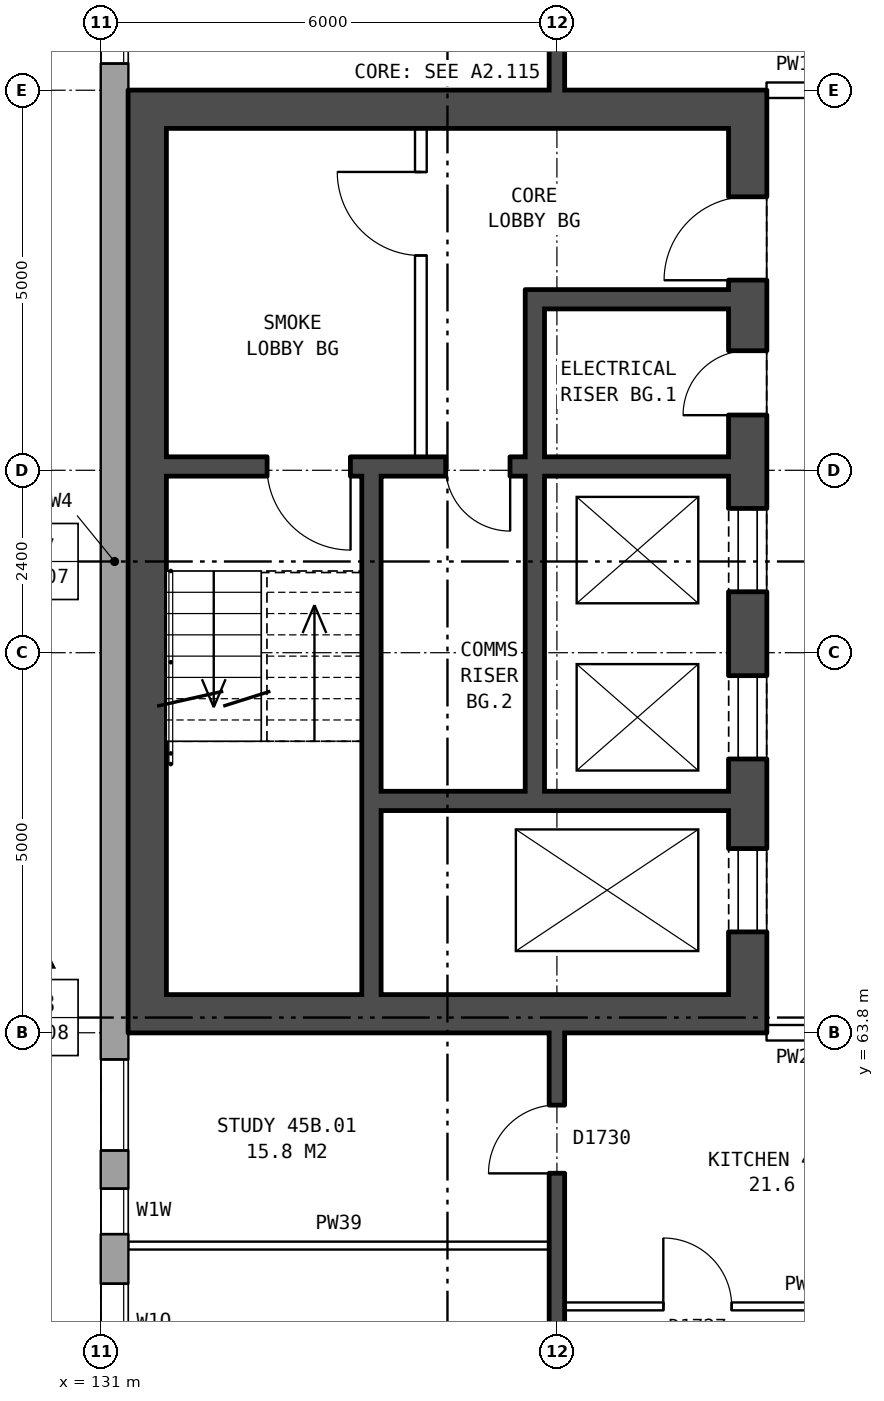
"""IFC4 building model, lengths in metres.
Left out: names, types, materials, properties, quantities, classifications, styles, units other than length and angle.
Written with IfcOpenShell. Run it as: python <this file> out.ifc"""

import sys

from ifc_helpers import new_model, si_unit, direction, frame, frame_2d, origin, place, context, subcontext, project, spatial, rectangle, extrude, element, fill, save


model = new_model("IFC4")
c1 = context("Model", 3, precision=1e-05, world=origin(), true_north=direction((0.0, 1.0)))
c2 = subcontext(c1, "Body", "Model", "MODEL_VIEW")
j1 = project(units=[si_unit("LENGTHUNIT", "METRE"), si_unit("PLANEANGLEUNIT", "RADIAN")], contexts=[c1])
p1 = place(None, origin())
s1 = spatial("IfcSite", under=j1, at=p1, CompositionType="ELEMENT")
p2 = place(p1, origin())
s2 = spatial("IfcBuilding", under=s1, at=p2, CompositionType="ELEMENT")
p3 = place(p2, frame((0.0, 0.0, 160.9)))
s3 = spatial("IfcBuildingStorey", under=s2, at=p3, CompositionType="ELEMENT", Elevation=160.9)
p4 = place(p3, frame((131.18, 82.925, 0.0), z_axis=(0.0, 0.0, 1.0), x_axis=(0.0, -1.0, 0.0)))
e1 = element("IfcWall", 1, at=p4, inside=s3, PredefinedType="STANDARD", context=c2, shape_type="SweptSolid", body=[
    extrude(rectangle(XDim=25.851, YDim=0.36, at=frame_2d((12.925, 0.0))), origin(), (0.0, 0.0, 1.0), 2.85),
])
p5 = place(p4, frame((1.075, 0.0, 0.8)))
e2 = element("IfcOpeningElement", 2, at=p5, cuts=e1, PredefinedType="OPENING", context=c2, shape_type="SweptSolid", body=[
    extrude(rectangle(XDim=1.2, YDim=1.8, at=frame_2d((0.6, 0.9))), frame((0.0, 0.19, 0.0), z_axis=(0.0, -1.0, 0.0), x_axis=(1.0, 0.0, 0.0)), (0.0, 0.0, 1.0), 0.38),
])
p6 = place(p4, frame((2.575, 0.0, 0.8)))
e3 = element("IfcOpeningElement", 3, at=p6, cuts=e1, PredefinedType="OPENING", context=c2, shape_type="SweptSolid", body=[
    extrude(rectangle(XDim=1.2, YDim=0.9, at=frame_2d((0.6, 0.45))), frame((0.0, 0.19, 0.0), z_axis=(0.0, -1.0, 0.0), x_axis=(1.0, 0.0, 0.0)), (0.0, 0.0, 1.0), 0.38),
])
p7 = place(p4, frame((19.475, 0.0, 1.65)))
e4 = element("IfcOpeningElement", 4, at=p7, cuts=e1, PredefinedType="OPENING", context=c2, shape_type="SweptSolid", body=[
    extrude(rectangle(XDim=1.2, YDim=0.9, at=frame_2d((0.6, 0.45))), frame((0.0, 0.19, 0.0), z_axis=(0.0, -1.0, 0.0), x_axis=(1.0, 0.0, 0.0)), (0.0, 0.0, 1.0), 0.38),
])
p8 = place(p4, frame((22.425, 0.0, 0.8)))
e5 = element("IfcOpeningElement", 5, at=p8, cuts=e1, PredefinedType="OPENING", context=c2, shape_type="SweptSolid", body=[
    extrude(rectangle(XDim=1.0, YDim=1.2, at=frame_2d((0.5, 0.6))), frame((0.0, 0.19, 0.0), z_axis=(0.0, -1.0, 0.0), x_axis=(1.0, 0.0, 0.0)), (0.0, 0.0, 1.0), 0.38),
])
p9 = place(p4, frame((4.975, 0.0, 1.7)))
e6 = element("IfcOpeningElement", 6, at=p9, cuts=e1, PredefinedType="OPENING", context=c2, shape_type="SweptSolid", body=[
    extrude(rectangle(XDim=1.4, YDim=0.9, at=frame_2d((0.7, 0.45))), frame((0.0, 0.19, 0.0), z_axis=(0.0, -1.0, 0.0), x_axis=(1.0, 0.0, 0.0)), (0.0, 0.0, 1.0), 0.38),
])
p10 = place(p4, frame((21.175, 0.0, 0.35)))
e7 = element("IfcOpeningElement", 7, at=p10, cuts=e1, PredefinedType="OPENING", context=c2, shape_type="SweptSolid", body=[
    extrude(rectangle(XDim=0.6, YDim=0.9, at=frame_2d((0.3, 0.45))), frame((0.0, 0.19, 0.0), z_axis=(0.0, -1.0, 0.0), x_axis=(1.0, 0.0, 0.0)), (0.0, 0.0, 1.0), 0.38),
])
p11 = place(p4, frame((23.725, 0.0, 0.8)))
e8 = element("IfcOpeningElement", 8, at=p11, cuts=e1, PredefinedType="OPENING", context=c2, shape_type="SweptSolid", body=[
    extrude(rectangle(XDim=1.4, YDim=1.8, at=frame_2d((0.7, 0.9))), frame((0.0, 0.19, 0.0), z_axis=(0.0, -1.0, 0.0), x_axis=(1.0, 0.0, 0.0)), (0.0, 0.0, 1.0), 0.38),
])
p12 = place(p3, frame((139.51, 63.8, 0.0), z_axis=(0.0, 0.0, 1.0), x_axis=(0.0, 1.0, 0.0)))
e9 = element("IfcWall", 9, at=p12, inside=s3, PredefinedType="SHEAR", context=c2, shape_type="SweptSolid", body=[
    extrude(rectangle(XDim=12.4, YDim=0.5, at=frame_2d((6.2, 0.0))), origin(), (0.0, 0.0, 1.0), 2.85),
])
p13 = place(p12, frame((1.325, 0.0, 0.0)))
e10 = element("IfcOpeningElement", 10, at=p13, cuts=e9, PredefinedType="OPENING", context=c2, shape_type="SweptSolid", body=[
    extrude(rectangle(XDim=1.1, YDim=2.1, at=frame_2d((0.55, 1.05))), frame((0.0, 0.26, 0.0), z_axis=(0.0, -1.0, 0.0), x_axis=(1.0, 0.0, 0.0)), (0.0, 0.0, 1.0), 0.52),
])
p14 = place(p12, frame((3.6, 0.0, 0.0)))
e11 = element("IfcOpeningElement", 11, at=p14, cuts=e9, PredefinedType="OPENING", context=c2, shape_type="SweptSolid", body=[
    extrude(rectangle(XDim=1.1, YDim=2.1, at=frame_2d((0.55, 1.05))), frame((0.0, 0.26, 0.0), z_axis=(0.0, -1.0, 0.0), x_axis=(1.0, 0.0, 0.0)), (0.0, 0.0, 1.0), 0.52),
])
p15 = place(p12, frame((5.8, 0.0, 0.0)))
e12 = element("IfcOpeningElement", 12, at=p15, cuts=e9, PredefinedType="OPENING", context=c2, shape_type="SweptSolid", body=[
    extrude(rectangle(XDim=1.1, YDim=2.1, at=frame_2d((0.55, 1.05))), frame((0.0, 0.26, 0.0), z_axis=(0.0, -1.0, 0.0), x_axis=(1.0, 0.0, 0.0)), (0.0, 0.0, 1.0), 0.52),
])
p16 = place(p12, frame((9.9, 0.0, 0.0)))
e13 = element("IfcOpeningElement", 13, at=p16, cuts=e9, PredefinedType="OPENING", context=c2, shape_type="SweptSolid", body=[
    extrude(rectangle(XDim=1.1, YDim=2.1, at=frame_2d((0.55, 1.05))), frame((0.0, 0.26, 0.0), z_axis=(0.0, -1.0, 0.0), x_axis=(1.0, 0.0, 0.0)), (0.0, 0.0, 1.0), 0.52),
])
p17 = place(p12, frame((8.125, 0.0, 0.0)))
e14 = element("IfcOpeningElement", 14, at=p17, cuts=e9, PredefinedType="OPENING", context=c2, shape_type="SweptSolid", body=[
    extrude(rectangle(XDim=0.85, YDim=2.1, at=frame_2d((0.425, 1.05))), frame((0.0, 0.26, 0.0), z_axis=(0.0, -1.0, 0.0), x_axis=(1.0, 0.0, 0.0)), (0.0, 0.0, 1.0), 0.52),
])
p18 = place(p3, frame((131.61, 63.8, 0.0), z_axis=(0.0, 0.0, 1.0), x_axis=(0.0, 1.0, 0.0)))
e15 = element("IfcWall", 15, at=p18, inside=s3, PredefinedType="SHEAR", context=c2, shape_type="SweptSolid", body=[
    extrude(rectangle(XDim=12.4, YDim=0.5, at=frame_2d((6.2, 0.0))), origin(), (0.0, 0.0, 1.0), 2.85),
])
for number, where, z_axis, x_axis in (
    (16, (139.26, 64.05, 0.0), (0.0, 0.0, 1.0), (-1.0, 0.0, 0.0)),
    (17, (139.26, 75.95, 0.0), (0.0, 0.0, 1.0), (-1.0, 0.0, 0.0)),
):
    element("IfcWall", number, at=place(p3, frame(where, z_axis=z_axis, x_axis=x_axis)), inside=s3, PredefinedType="SHEAR", context=c2, shape_type="SweptSolid", body=[
        extrude(rectangle(XDim=7.4, YDim=0.5, at=frame_2d((3.7, 0.0))), origin(), (0.0, 0.0, 1.0), 2.85),
    ])
p19 = place(p3, frame((139.26, 66.85, 0.0), z_axis=(0.0, 0.0, 1.0), x_axis=(-1.0, 0.0, 0.0)))
e18 = element("IfcWall", 18, at=p19, inside=s3, PredefinedType="SHEAR", context=c2, shape_type="SweptSolid", body=[
    extrude(rectangle(XDim=4.575, YDim=0.25, at=frame_2d((2.288, 0.0))), origin(), (0.0, 0.0, 1.0), 2.85),
])
p20 = place(p3, frame((139.26, 71.25, 0.0), z_axis=(0.0, 0.0, 1.0), x_axis=(-1.0, 0.0, 0.0)))
e19 = element("IfcWall", 19, at=p20, inside=s3, PredefinedType="SHEAR", context=c2, shape_type="SweptSolid", body=[
    extrude(rectangle(XDim=7.4, YDim=0.25, at=frame_2d((3.7, 0.0))), origin(), (0.0, 0.0, 1.0), 2.85),
])
p21 = place(p20, frame((4.975, 0.0, 0.0)))
e20 = element("IfcOpeningElement", 20, at=p21, cuts=e19, PredefinedType="OPENING", context=c2, shape_type="SweptSolid", body=[
    extrude(rectangle(XDim=1.1, YDim=2.1, at=frame_2d((0.55, 1.05))), frame((0.0, 0.135, 0.0), z_axis=(0.0, -1.0, 0.0), x_axis=(1.0, 0.0, 0.0)), (0.0, 0.0, 1.0), 0.27),
])
p22 = place(p20, frame((2.875, 0.0, 0.0)))
e21 = element("IfcOpeningElement", 21, at=p22, cuts=e19, PredefinedType="OPENING", context=c2, shape_type="SweptSolid", body=[
    extrude(rectangle(XDim=0.85, YDim=2.1, at=frame_2d((0.425, 1.05))), frame((0.0, 0.135, 0.0), z_axis=(0.0, -1.0, 0.0), x_axis=(1.0, 0.0, 0.0)), (0.0, 0.0, 1.0), 0.27),
])
p23 = place(p3, frame((139.26, 73.45, 0.0), z_axis=(0.0, 0.0, 1.0), x_axis=(-1.0, 0.0, 0.0)))
e22 = element("IfcWall", 22, at=p23, inside=s3, PredefinedType="SHEAR", context=c2, shape_type="SweptSolid", body=[
    extrude(rectangle(XDim=2.425, YDim=0.25, at=frame_2d((1.212, 0.0))), origin(), (0.0, 0.0, 1.0), 2.85),
])
p24 = place(p3, frame((136.71, 66.975, 0.0), z_axis=(0.0, 0.0, 1.0), x_axis=(0.0, 1.0, 0.0)))
e23 = element("IfcWall", 23, at=p24, inside=s3, PredefinedType="SHEAR", context=c2, shape_type="SweptSolid", body=[
    extrude(rectangle(XDim=4.15, YDim=0.25, at=frame_2d((2.075, 0.0))), origin(), (0.0, 0.0, 1.0), 2.85),
])
p25 = place(p3, frame((136.71, 71.375, 0.0), z_axis=(0.0, 0.0, 1.0), x_axis=(0.0, 1.0, 0.0)))
e24 = element("IfcWall", 24, at=p25, inside=s3, PredefinedType="SHEAR", context=c2, shape_type="SweptSolid", body=[
    extrude(rectangle(XDim=2.2, YDim=0.25, at=frame_2d((1.1, 0.0))), origin(), (0.0, 0.0, 1.0), 2.85),
])
p26 = place(p3, frame((135.21, 71.375, 0.0), z_axis=(0.0, 0.0, 1.0), x_axis=(0.0, 1.0, 0.0)))
e25 = element("IfcWall", 25, at=p26, inside=s3, PredefinedType="PARTITIONING", context=c2, shape_type="SweptSolid", body=[
    extrude(rectangle(XDim=4.325, YDim=0.15, at=frame_2d((2.163, 0.0))), origin(), (0.0, 0.0, 1.0), 2.85),
])
p27 = place(p26, frame((2.65, 0.0, 0.0)))
e26 = element("IfcOpeningElement", 26, at=p27, cuts=e25, PredefinedType="OPENING", context=c2, shape_type="SweptSolid", body=[
    extrude(rectangle(XDim=1.1, YDim=2.1, at=frame_2d((0.55, 1.05))), frame((0.0, 0.085, 0.0), z_axis=(0.0, -1.0, 0.0), x_axis=(1.0, 0.0, 0.0)), (0.0, 0.0, 1.0), 0.17),
])
p28 = place(p3, frame((134.56, 64.3, 0.0), z_axis=(0.0, 0.0, 1.0), x_axis=(0.0, 1.0, 0.0)))
e27 = element("IfcWall", 27, at=p28, inside=s3, PredefinedType="SHEAR", context=c2, shape_type="SweptSolid", body=[
    extrude(rectangle(XDim=6.825, YDim=0.25, at=frame_2d((3.413, 0.0))), origin(), (0.0, 0.0, 1.0), 2.85),
])
p29 = place(p3, frame((137.1, 60.2, 0.0), z_axis=(0.0, 0.0, 1.0), x_axis=(1.0, 0.0, 0.0)))
e28 = element("IfcWall", 28, at=p29, inside=s3, PredefinedType="PARTITIONING", context=c2, shape_type="SweptSolid", body=[
    extrude(rectangle(XDim=5.8, YDim=0.1, at=frame_2d((2.9, 0.0))), origin(), (0.0, 0.0, 1.0), 2.85),
])
p30 = place(p29, frame((1.3, 0.0, 0.0)))
e29 = element("IfcOpeningElement", 29, at=p30, cuts=e28, PredefinedType="OPENING", context=c2, shape_type="SweptSolid", body=[
    extrude(rectangle(XDim=0.9, YDim=2.1, at=frame_2d((0.45, 1.05))), frame((0.0, 0.06, 0.0), z_axis=(0.0, -1.0, 0.0), x_axis=(1.0, 0.0, 0.0)), (0.0, 0.0, 1.0), 0.12),
])
p31 = place(p29, frame((4.2, 0.0, 0.0)))
e30 = element("IfcOpeningElement", 30, at=p31, cuts=e28, PredefinedType="OPENING", context=c2, shape_type="SweptSolid", body=[
    extrude(rectangle(XDim=0.9, YDim=2.1, at=frame_2d((0.45, 1.05))), frame((0.0, 0.06, 0.0), z_axis=(0.0, -1.0, 0.0), x_axis=(1.0, 0.0, 0.0)), (0.0, 0.0, 1.0), 0.12),
])
p32 = place(p3, frame((131.36, 61.0, 0.0), z_axis=(0.0, 0.0, 1.0), x_axis=(1.0, 0.0, 0.0)))
e31 = element("IfcWall", 31, at=p32, inside=s3, PredefinedType="PARTITIONING", context=c2, shape_type="SweptSolid", body=[
    extrude(rectangle(XDim=5.54, YDim=0.1, at=frame_2d((2.77, 0.0))), origin(), (0.0, 0.0, 1.0), 2.85),
])
p33 = place(p3, frame((139.76, 63.8, 0.0), z_axis=(0.0, 0.0, 1.0), x_axis=(1.0, 0.0, 0.0)))
e32 = element("IfcWall", 32, at=p33, inside=s3, PredefinedType="PARTITIONING", context=c2, shape_type="SweptSolid", body=[
    extrude(rectangle(XDim=3.0, YDim=0.2, at=frame_2d((1.5, 0.0))), origin(), (0.0, 0.0, 1.0), 2.85),
])
p34 = place(p33, frame((1.0, 0.0, 0.0)))
e33 = element("IfcOpeningElement", 33, at=p34, cuts=e32, PredefinedType="OPENING", context=c2, shape_type="SweptSolid", body=[
    extrude(rectangle(XDim=1.0, YDim=2.1, at=frame_2d((0.5, 1.05))), frame((0.0, 0.11, 0.0), z_axis=(0.0, -1.0, 0.0), x_axis=(1.0, 0.0, 0.0)), (0.0, 0.0, 1.0), 0.22),
])
p35 = place(p3, frame((139.76, 76.2, 0.0), z_axis=(0.0, 0.0, 1.0), x_axis=(1.0, 0.0, 0.0)))
e34 = element("IfcWall", 34, at=p35, inside=s3, PredefinedType="PARTITIONING", context=c2, shape_type="SweptSolid", body=[
    extrude(rectangle(XDim=3.0, YDim=0.2, at=frame_2d((1.5, 0.0))), origin(), (0.0, 0.0, 1.0), 2.85),
])
p36 = place(p35, frame((1.0, 0.0, 0.0)))
e35 = element("IfcOpeningElement", 35, at=p36, cuts=e34, PredefinedType="OPENING", context=c2, shape_type="SweptSolid", body=[
    extrude(rectangle(XDim=1.0, YDim=2.1, at=frame_2d((0.5, 1.05))), frame((0.0, 0.11, 0.0), z_axis=(0.0, -1.0, 0.0), x_axis=(1.0, 0.0, 0.0)), (0.0, 0.0, 1.0), 0.22),
])
p37 = place(p3, frame((137.0, 54.36, 0.0), z_axis=(0.0, 0.0, 1.0), x_axis=(0.0, 1.0, 0.0)))
e36 = element("IfcWall", 36, at=p37, inside=s3, PredefinedType="SOLIDWALL", context=c2, shape_type="SweptSolid", body=[
    extrude(rectangle(XDim=9.44, YDim=0.2, at=frame_2d((4.72, 0.0))), origin(), (0.0, 0.0, 1.0), 2.85),
])
p38 = place(p37, frame((2.47, 0.0, 0.0)))
e37 = element("IfcOpeningElement", 37, at=p38, cuts=e36, PredefinedType="OPENING", context=c2, shape_type="SweptSolid", body=[
    extrude(rectangle(XDim=0.9, YDim=2.1, at=frame_2d((0.45, 1.05))), frame((0.0, 0.11, 0.0), z_axis=(0.0, -1.0, 0.0), x_axis=(1.0, 0.0, 0.0)), (0.0, 0.0, 1.0), 0.22),
])
p39 = place(p37, frame((7.59, 0.0, 0.0)))
e38 = element("IfcOpeningElement", 38, at=p39, cuts=e36, PredefinedType="OPENING", context=c2, shape_type="SweptSolid", body=[
    extrude(rectangle(XDim=0.9, YDim=2.1, at=frame_2d((0.45, 1.05))), frame((0.0, 0.11, 0.0), z_axis=(0.0, -1.0, 0.0), x_axis=(1.0, 0.0, 0.0)), (0.0, 0.0, 1.0), 0.22),
])
p40 = place(p3, frame((137.0, 76.2, 0.0), z_axis=(0.0, 0.0, 1.0), x_axis=(0.0, 1.0, 0.0)))
e39 = element("IfcWall", 39, at=p40, inside=s3, PredefinedType="SOLIDWALL", context=c2, shape_type="SweptSolid", body=[
    extrude(rectangle(XDim=9.44, YDim=0.2, at=frame_2d((4.72, 0.0))), origin(), (0.0, 0.0, 1.0), 2.85),
])
p41 = place(p40, frame((1.35, 0.0, 0.0)))
e40 = element("IfcOpeningElement", 40, at=p41, cuts=e39, PredefinedType="OPENING", context=c2, shape_type="SweptSolid", body=[
    extrude(rectangle(XDim=0.9, YDim=2.1, at=frame_2d((0.45, 1.05))), frame((0.0, 0.11, 0.0), z_axis=(0.0, -1.0, 0.0), x_axis=(1.0, 0.0, 0.0)), (0.0, 0.0, 1.0), 0.22),
])
p42 = place(p7, origin())
e41 = element("IfcWindow", 41, at=p42, inside=s3, PartitioningType="SINGLE_PANEL", PredefinedType="WINDOW", context=c2, shape_type="SweptSolid", body=[
    extrude(rectangle(XDim=1.2, YDim=0.9, at=frame_2d((0.6, 0.45))), frame((0.0, 0.15, 0.0), z_axis=(0.0, -1.0, 0.0), x_axis=(1.0, 0.0, 0.0)), (0.0, 0.0, 1.0), 0.06),
])
fill(e4, e41)
p43 = place(p8, origin())
e42 = element("IfcWindow", 42, at=p43, inside=s3, PartitioningType="SINGLE_PANEL", PredefinedType="WINDOW", context=c2, shape_type="SweptSolid", body=[
    extrude(rectangle(XDim=1.0, YDim=1.2, at=frame_2d((0.5, 0.6))), frame((0.0, 0.15, 0.0), z_axis=(0.0, -1.0, 0.0), x_axis=(1.0, 0.0, 0.0)), (0.0, 0.0, 1.0), 0.06),
])
fill(e5, e42)
p44 = place(p13, origin())
e43 = element("IfcDoor", 43, at=p44, inside=s3, OperationType="DOUBLE_DOOR_SLIDING", PredefinedType="DOOR", context=c2, shape_type="SweptSolid", body=[
    extrude(rectangle(XDim=1.1, YDim=2.1, at=frame_2d((0.55, 1.05))), frame((0.0, 0.235, 0.0), z_axis=(0.0, -1.0, 0.0), x_axis=(1.0, 0.0, 0.0)), (0.0, 0.0, 1.0), 0.05),
])
fill(e10, e43)
p45 = place(p14, origin())
e44 = element("IfcDoor", 44, at=p45, inside=s3, OperationType="DOUBLE_DOOR_SLIDING", PredefinedType="DOOR", context=c2, shape_type="SweptSolid", body=[
    extrude(rectangle(XDim=1.1, YDim=2.1, at=frame_2d((0.55, 1.05))), frame((0.0, 0.235, 0.0), z_axis=(0.0, -1.0, 0.0), x_axis=(1.0, 0.0, 0.0)), (0.0, 0.0, 1.0), 0.05),
])
fill(e11, e44)
p46 = place(p15, origin())
e45 = element("IfcDoor", 45, at=p46, inside=s3, OperationType="DOUBLE_DOOR_SLIDING", PredefinedType="DOOR", context=c2, shape_type="SweptSolid", body=[
    extrude(rectangle(XDim=1.1, YDim=2.1, at=frame_2d((0.55, 1.05))), frame((0.0, 0.235, 0.0), z_axis=(0.0, -1.0, 0.0), x_axis=(1.0, 0.0, 0.0)), (0.0, 0.0, 1.0), 0.05),
])
fill(e12, e45)
p47 = place(p16, origin())
e46 = element("IfcDoor", 46, at=p47, inside=s3, OperationType="SINGLE_SWING_LEFT", PredefinedType="DOOR", context=c2, shape_type="SweptSolid", body=[
    extrude(rectangle(XDim=1.1, YDim=2.1, at=frame_2d((0.55, 1.05))), frame((0.0, 0.235, 0.0), z_axis=(0.0, -1.0, 0.0), x_axis=(1.0, 0.0, 0.0)), (0.0, 0.0, 1.0), 0.05),
])
fill(e13, e46)
p48 = place(p27, origin())
e47 = element("IfcDoor", 47, at=p48, inside=s3, OperationType="SINGLE_SWING_RIGHT", PredefinedType="DOOR", context=c2, shape_type="SweptSolid", body=[
    extrude(rectangle(XDim=1.1, YDim=2.1, at=frame_2d((0.55, 1.05))), frame((0.0, 0.025, 0.0), z_axis=(0.0, -1.0, 0.0), x_axis=(1.0, 0.0, 0.0)), (0.0, 0.0, 1.0), 0.05),
])
fill(e26, e47)
p49 = place(p21, origin())
e48 = element("IfcDoor", 48, at=p49, inside=s3, OperationType="SINGLE_SWING_LEFT", PredefinedType="DOOR", context=c2, shape_type="SweptSolid", body=[
    extrude(rectangle(XDim=1.1, YDim=2.1, at=frame_2d((0.55, 1.05))), frame((0.0, 0.025, 0.0), z_axis=(0.0, -1.0, 0.0), x_axis=(1.0, 0.0, 0.0)), (0.0, 0.0, 1.0), 0.05),
])
fill(e20, e48)
p50 = place(p17, origin())
e49 = element("IfcDoor", 49, at=p50, inside=s3, OperationType="SINGLE_SWING_LEFT", PredefinedType="DOOR", context=c2, shape_type="SweptSolid", body=[
    extrude(rectangle(XDim=0.85, YDim=2.1, at=frame_2d((0.425, 1.05))), frame((0.0, 0.235, 0.0), z_axis=(0.0, -1.0, 0.0), x_axis=(1.0, 0.0, 0.0)), (0.0, 0.0, 1.0), 0.05),
])
fill(e14, e49)
p51 = place(p22, origin())
e50 = element("IfcDoor", 50, at=p51, inside=s3, OperationType="SINGLE_SWING_LEFT", PredefinedType="DOOR", context=c2, shape_type="SweptSolid", body=[
    extrude(rectangle(XDim=0.85, YDim=2.1, at=frame_2d((0.425, 1.05))), frame((0.0, 0.025, 0.0), z_axis=(0.0, -1.0, 0.0), x_axis=(1.0, 0.0, 0.0)), (0.0, 0.0, 1.0), 0.05),
])
fill(e21, e50)
p52 = place(p39, origin())
e51 = element("IfcDoor", 51, at=p52, inside=s3, OperationType="SINGLE_SWING_LEFT", PredefinedType="DOOR", context=c2, shape_type="SweptSolid", body=[
    extrude(rectangle(XDim=0.9, YDim=2.1, at=frame_2d((0.45, 1.05))), frame((0.0, 0.025, 0.0), z_axis=(0.0, -1.0, 0.0), x_axis=(1.0, 0.0, 0.0)), (0.0, 0.0, 1.0), 0.05),
])
fill(e38, e51)
p53 = place(p30, origin())
e52 = element("IfcDoor", 52, at=p53, inside=s3, OperationType="SINGLE_SWING_LEFT", PredefinedType="DOOR", context=c2, shape_type="SweptSolid", body=[
    extrude(rectangle(XDim=0.9, YDim=2.1, at=frame_2d((0.45, 1.05))), frame((0.0, 0.025, 0.0), z_axis=(0.0, -1.0, 0.0), x_axis=(1.0, 0.0, 0.0)), (0.0, 0.0, 1.0), 0.05),
])
fill(e29, e52)
p54 = place(p9, origin())
e53 = element("IfcWindow", 53, at=p54, inside=s3, PartitioningType="SINGLE_PANEL", PredefinedType="WINDOW", context=c2, shape_type="SweptSolid", body=[
    extrude(rectangle(XDim=1.4, YDim=0.9, at=frame_2d((0.7, 0.45))), frame((0.0, 0.15, 0.0), z_axis=(0.0, -1.0, 0.0), x_axis=(1.0, 0.0, 0.0)), (0.0, 0.0, 1.0), 0.06),
])
fill(e6, e53)
p55 = place(p10, origin())
e54 = element("IfcWindow", 54, at=p55, inside=s3, PartitioningType="SINGLE_PANEL", PredefinedType="WINDOW", context=c2, shape_type="SweptSolid", body=[
    extrude(rectangle(XDim=0.6, YDim=0.9, at=frame_2d((0.3, 0.45))), frame((0.0, 0.15, 0.0), z_axis=(0.0, -1.0, 0.0), x_axis=(1.0, 0.0, 0.0)), (0.0, 0.0, 1.0), 0.06),
])
fill(e7, e54)
save(model, sys.argv[1])
